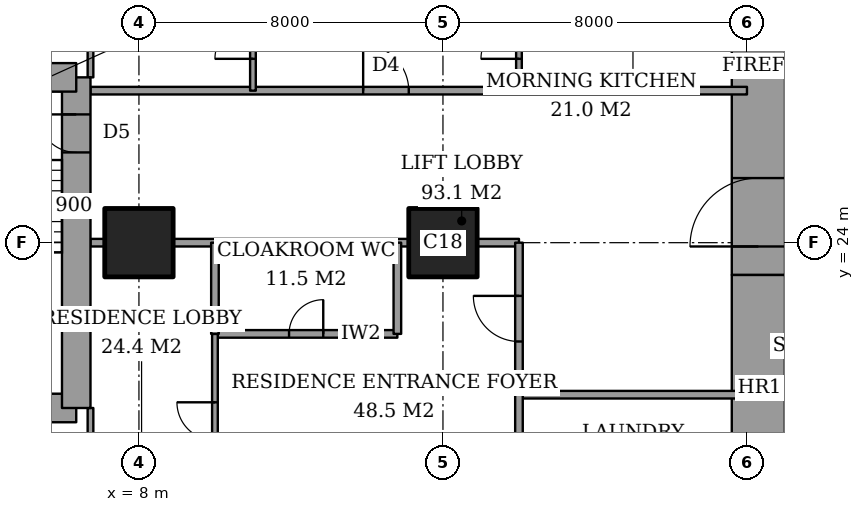
"""IFC4 building model, lengths in metres.
Left out: names, types, materials, properties, quantities, classifications, styles, units other than length and angle.
Written with IfcOpenShell. Run it as: python <this file> out.ifc"""

import sys

from ifc_helpers import new_model, si_unit, direction, frame, frame_2d, origin, origin_2d, place, context, subcontext, project, spatial, rectangle, extrude, element, fill, save


model = new_model("IFC4")
c1 = context("Model", 3, precision=1e-05, world=origin(), true_north=direction((0.0, 1.0)))
c2 = subcontext(c1, "Body", "Model", "MODEL_VIEW")
j1 = project(units=[si_unit("LENGTHUNIT", "METRE"), si_unit("PLANEANGLEUNIT", "RADIAN")], contexts=[c1])
p1 = place(None, origin())
s1 = spatial("IfcSite", under=j1, at=p1, CompositionType="ELEMENT")
p2 = place(p1, origin())
s2 = spatial("IfcBuilding", under=s1, at=p2, CompositionType="ELEMENT")
p3 = place(p2, frame((0.0, 0.0, 203.8)))
s3 = spatial("IfcBuildingStorey", under=s2, at=p3, CompositionType="ELEMENT", Elevation=203.8)
for number, where, z_axis, x_axis in (
    (1, (8.0, 24.0, 0.0), (0.0, 0.0, 1.0), (1.0, 0.0, 0.0)),
    (2, (16.0, 24.0, 0.0), (0.0, 0.0, 1.0), (1.0, 0.0, 0.0)),
):
    element("IfcColumn", number, at=place(p3, frame(where, z_axis=z_axis, x_axis=x_axis)), inside=s3, PredefinedType="COLUMN", context=c2, shape_type="SweptSolid", body=[
        extrude(rectangle(XDim=1.8, YDim=1.8, at=origin_2d()), origin(), (0.0, 0.0, 1.0), 3.6),
    ])
p4 = place(p3, frame((24.3, 13.0, 0.0), z_axis=(0.0, 0.0, 1.0), x_axis=(0.0, 1.0, 0.0)))
e3 = element("IfcWall", 3, at=p4, inside=s3, PredefinedType="SHEAR", context=c2, shape_type="SweptSolid", body=[
    extrude(rectangle(XDim=10.15, YDim=1.4, at=frame_2d((5.075, 0.0))), origin(), (0.0, 0.0, 1.0), 3.6),
])
p5 = place(p3, frame((24.3, 23.15, 0.0), z_axis=(0.0, 0.0, 1.0), x_axis=(0.0, 1.0, 0.0)))
e4 = element("IfcWall", 4, at=p5, inside=s3, PredefinedType="SHEAR", context=c2, shape_type="SweptSolid", body=[
    extrude(rectangle(XDim=11.85, YDim=1.4, at=frame_2d((5.925, 0.0))), origin(), (0.0, 0.0, 1.0), 3.6),
])
p6 = place(p5, frame((0.75, 0.0, 0.0)))
e5 = element("IfcOpeningElement", 5, at=p6, cuts=e4, PredefinedType="OPENING", context=c2, shape_type="SweptSolid", body=[
    extrude(rectangle(XDim=1.8, YDim=2.4, at=frame_2d((0.9, 1.2))), frame((0.0, 0.71, 0.0), z_axis=(0.0, -1.0, 0.0), x_axis=(1.0, 0.0, 0.0)), (0.0, 0.0, 1.0), 1.42),
])
p7 = place(p3, frame((1.9, 19.65, 0.0), z_axis=(0.0, 0.0, 1.0), x_axis=(1.0, 0.0, 0.0)))
e6 = element("IfcWall", 6, at=p7, inside=s3, PredefinedType="SHEAR", context=c2, shape_type="SweptSolid", body=[
    extrude(rectangle(XDim=4.45, YDim=0.75, at=frame_2d((2.225, 0.0))), origin(), (0.0, 0.0, 1.0), 3.6),
])
p8 = place(p3, frame((6.35, 19.65, 0.0), z_axis=(0.0, 0.0, 1.0), x_axis=(0.0, 1.0, 0.0)))
e7 = element("IfcWall", 7, at=p8, inside=s3, PredefinedType="SHEAR", context=c2, shape_type="SweptSolid", body=[
    extrude(rectangle(XDim=8.7, YDim=0.75, at=frame_2d((4.35, 0.0))), origin(), (0.0, 0.0, 1.0), 3.6),
])
p9 = place(p8, frame((6.725, 0.0, 0.0)))
e8 = element("IfcOpeningElement", 8, at=p9, cuts=e7, PredefinedType="OPENING", context=c2, shape_type="SweptSolid", body=[
    extrude(rectangle(XDim=1.0, YDim=2.1, at=frame_2d((0.5, 1.05))), frame((0.0, 0.385, 0.0), z_axis=(0.0, -1.0, 0.0), x_axis=(1.0, 0.0, 0.0)), (0.0, 0.0, 1.0), 0.77),
])
p10 = place(p3, frame((6.35, 28.35, 0.0), z_axis=(0.0, 0.0, 1.0), x_axis=(-1.0, 0.0, 0.0)))
e9 = element("IfcWall", 9, at=p10, inside=s3, PredefinedType="SHEAR", context=c2, shape_type="SweptSolid", body=[
    extrude(rectangle(XDim=4.45, YDim=0.75, at=frame_2d((2.225, 0.0))), origin(), (0.0, 0.0, 1.0), 3.6),
])
p11 = place(p3, frame((18.0, 20.0, 0.0), z_axis=(0.0, 0.0, 1.0), x_axis=(1.0, 0.0, 0.0)))
e10 = element("IfcWall", 10, at=p11, inside=s3, PredefinedType="PARTITIONING", context=c2, shape_type="SweptSolid", body=[
    extrude(rectangle(XDim=6.0, YDim=0.2, at=frame_2d((3.0, 0.0))), origin(), (0.0, 0.0, 1.0), 3.35),
])
p12 = place(p3, frame((10.0, 21.6, 0.0), z_axis=(0.0, 0.0, 1.0), x_axis=(1.0, 0.0, 0.0)))
e11 = element("IfcWall", 11, at=p12, inside=s3, PredefinedType="PARTITIONING", context=c2, shape_type="SweptSolid", body=[
    extrude(rectangle(XDim=4.8, YDim=0.2, at=frame_2d((2.4, 0.0))), origin(), (0.0, 0.0, 1.0), 3.35),
])
p13 = place(p12, frame((1.95, 0.0, 0.0)))
e12 = element("IfcOpeningElement", 12, at=p13, cuts=e11, PredefinedType="OPENING", context=c2, shape_type="SweptSolid", body=[
    extrude(rectangle(XDim=0.9, YDim=2.1, at=frame_2d((0.45, 1.05))), frame((0.0, 0.11, 0.0), z_axis=(0.0, -1.0, 0.0), x_axis=(1.0, 0.0, 0.0)), (0.0, 0.0, 1.0), 0.22),
])
p14 = place(p3, frame((6.725, 24.0, 0.0), z_axis=(0.0, 0.0, 1.0), x_axis=(1.0, 0.0, 0.0)))
e13 = element("IfcWall", 13, at=p14, inside=s3, PredefinedType="PARTITIONING", context=c2, shape_type="SweptSolid", body=[
    extrude(rectangle(XDim=0.375, YDim=0.2, at=frame_2d((0.188, 0.0))), origin(), (0.0, 0.0, 1.0), 3.35),
])
p15 = place(p3, frame((8.9, 24.0, 0.0), z_axis=(0.0, 0.0, 1.0), x_axis=(1.0, 0.0, 0.0)))
e14 = element("IfcWall", 14, at=p15, inside=s3, PredefinedType="PARTITIONING", context=c2, shape_type="SweptSolid", body=[
    extrude(rectangle(XDim=6.2, YDim=0.2, at=frame_2d((3.1, 0.0))), origin(), (0.0, 0.0, 1.0), 3.35),
])
p16 = place(p3, frame((16.9, 24.0, 0.0), z_axis=(0.0, 0.0, 1.0), x_axis=(1.0, 0.0, 0.0)))
e15 = element("IfcWall", 15, at=p16, inside=s3, PredefinedType="PARTITIONING", context=c2, shape_type="SweptSolid", body=[
    extrude(rectangle(XDim=1.1, YDim=0.2, at=frame_2d((0.55, 0.0))), origin(), (0.0, 0.0, 1.0), 3.35),
])
p17 = place(p3, frame((6.725, 28.0, 0.0), z_axis=(0.0, 0.0, 1.0), x_axis=(1.0, 0.0, 0.0)))
e16 = element("IfcWall", 16, at=p17, inside=s3, PredefinedType="PARTITIONING", context=c2, shape_type="SweptSolid", body=[
    extrude(rectangle(XDim=17.275, YDim=0.2, at=frame_2d((8.637, 0.0))), origin(), (0.0, 0.0, 1.0), 3.35),
])
p18 = place(p17, frame((7.175, 0.0, 0.0)))
e17 = element("IfcOpeningElement", 17, at=p18, cuts=e16, PredefinedType="OPENING", context=c2, shape_type="SweptSolid", body=[
    extrude(rectangle(XDim=1.2, YDim=2.4, at=frame_2d((0.6, 1.2))), frame((0.0, 0.11, 0.0), z_axis=(0.0, -1.0, 0.0), x_axis=(1.0, 0.0, 0.0)), (0.0, 0.0, 1.0), 0.22),
])
p19 = place(p3, frame((6.725, 17.2, 0.0), z_axis=(0.0, 0.0, 1.0), x_axis=(0.0, 1.0, 0.0)))
e18 = element("IfcWall", 18, at=p19, inside=s3, PredefinedType="PARTITIONING", context=c2, shape_type="SweptSolid", body=[
    extrude(rectangle(XDim=2.45, YDim=0.15, at=frame_2d((1.225, 0.0))), origin(), (0.0, 0.0, 1.0), 3.35),
])
p20 = place(p19, frame((0.538, 0.0, 0.0)))
e19 = element("IfcOpeningElement", 19, at=p20, cuts=e18, PredefinedType="OPENING", context=c2, shape_type="SweptSolid", body=[
    extrude(rectangle(XDim=1.0, YDim=2.1, at=frame_2d((0.5, 1.05))), frame((0.0, 0.085, 0.0), z_axis=(0.0, -1.0, 0.0), x_axis=(1.0, 0.0, 0.0)), (0.0, 0.0, 1.0), 0.17),
])
p21 = place(p3, frame((6.725, 28.35, 0.0), z_axis=(0.0, 0.0, 1.0), x_axis=(0.0, 1.0, 0.0)))
e20 = element("IfcWall", 20, at=p21, inside=s3, PredefinedType="PARTITIONING", context=c2, shape_type="SweptSolid", body=[
    extrude(rectangle(XDim=2.45, YDim=0.15, at=frame_2d((1.225, 0.0))), origin(), (0.0, 0.0, 1.0), 3.35),
])
p22 = place(p21, frame((0.913, 0.0, 0.0)))
e21 = element("IfcOpeningElement", 21, at=p22, cuts=e20, PredefinedType="OPENING", context=c2, shape_type="SweptSolid", body=[
    extrude(rectangle(XDim=1.0, YDim=2.1, at=frame_2d((0.5, 1.05))), frame((0.0, 0.085, 0.0), z_axis=(0.0, -1.0, 0.0), x_axis=(1.0, 0.0, 0.0)), (0.0, 0.0, 1.0), 0.17),
])
p23 = place(p3, frame((10.0, 21.6, 0.0), z_axis=(0.0, 0.0, 1.0), x_axis=(0.0, 1.0, 0.0)))
e22 = element("IfcWall", 22, at=p23, inside=s3, PredefinedType="PARTITIONING", context=c2, shape_type="SweptSolid", body=[
    extrude(rectangle(XDim=2.4, YDim=0.2, at=frame_2d((1.2, 0.0))), origin(), (0.0, 0.0, 1.0), 3.35),
])
p24 = place(p3, frame((10.0, 10.6, 0.0), z_axis=(0.0, 0.0, 1.0), x_axis=(0.0, 1.0, 0.0)))
e23 = element("IfcWall", 23, at=p24, inside=s3, PredefinedType="PARTITIONING", context=c2, shape_type="SweptSolid", body=[
    extrude(rectangle(XDim=11.0, YDim=0.15, at=frame_2d((5.5, 0.0))), origin(), (0.0, 0.0, 1.0), 3.35),
])
p25 = place(p24, frame((8.2, 0.0, 0.0)))
e24 = element("IfcOpeningElement", 24, at=p25, cuts=e23, PredefinedType="OPENING", context=c2, shape_type="SweptSolid", body=[
    extrude(rectangle(XDim=1.0, YDim=2.1, at=frame_2d((0.5, 1.05))), frame((0.0, 0.085, 0.0), z_axis=(0.0, -1.0, 0.0), x_axis=(1.0, 0.0, 0.0)), (0.0, 0.0, 1.0), 0.17),
])
p26 = place(p3, frame((11.0, 28.0, 0.0), z_axis=(0.0, 0.0, 1.0), x_axis=(0.0, 1.0, 0.0)))
e25 = element("IfcWall", 25, at=p26, inside=s3, PredefinedType="PARTITIONING", context=c2, shape_type="SweptSolid", body=[
    extrude(rectangle(XDim=9.2, YDim=0.15, at=frame_2d((4.6, 0.0))), origin(), (0.0, 0.0, 1.0), 3.35),
])
p27 = place(p26, frame((0.837, 0.0, 0.0)))
e26 = element("IfcOpeningElement", 26, at=p27, cuts=e25, PredefinedType="OPENING", context=c2, shape_type="SweptSolid", body=[
    extrude(rectangle(XDim=1.0, YDim=2.1, at=frame_2d((0.5, 1.05))), frame((0.0, 0.085, 0.0), z_axis=(0.0, -1.0, 0.0), x_axis=(1.0, 0.0, 0.0)), (0.0, 0.0, 1.0), 0.17),
])
p28 = place(p3, frame((14.8, 21.6, 0.0), z_axis=(0.0, 0.0, 1.0), x_axis=(0.0, 1.0, 0.0)))
e27 = element("IfcWall", 27, at=p28, inside=s3, PredefinedType="PARTITIONING", context=c2, shape_type="SweptSolid", body=[
    extrude(rectangle(XDim=2.4, YDim=0.2, at=frame_2d((1.2, 0.0))), origin(), (0.0, 0.0, 1.0), 3.35),
])
p29 = place(p3, frame((18.0, 17.0, 0.0), z_axis=(0.0, 0.0, 1.0), x_axis=(0.0, 1.0, 0.0)))
e28 = element("IfcWall", 28, at=p29, inside=s3, PredefinedType="PARTITIONING", context=c2, shape_type="SweptSolid", body=[
    extrude(rectangle(XDim=7.0, YDim=0.2, at=frame_2d((3.5, 0.0))), origin(), (0.0, 0.0, 1.0), 3.35),
])
p30 = place(p29, frame((4.4, 0.0, 0.0)))
e29 = element("IfcOpeningElement", 29, at=p30, cuts=e28, PredefinedType="OPENING", context=c2, shape_type="SweptSolid", body=[
    extrude(rectangle(XDim=1.2, YDim=2.4, at=frame_2d((0.6, 1.2))), frame((0.0, 0.11, 0.0), z_axis=(0.0, -1.0, 0.0), x_axis=(1.0, 0.0, 0.0)), (0.0, 0.0, 1.0), 0.22),
])
p31 = place(p29, frame((1.05, 0.0, 0.0)))
e30 = element("IfcOpeningElement", 30, at=p31, cuts=e28, PredefinedType="OPENING", context=c2, shape_type="SweptSolid", body=[
    extrude(rectangle(XDim=0.9, YDim=2.1, at=frame_2d((0.45, 1.05))), frame((0.0, 0.11, 0.0), z_axis=(0.0, -1.0, 0.0), x_axis=(1.0, 0.0, 0.0)), (0.0, 0.0, 1.0), 0.22),
])
p32 = place(p3, frame((18.0, 28.0, 0.0), z_axis=(0.0, 0.0, 1.0), x_axis=(0.0, 1.0, 0.0)))
e31 = element("IfcWall", 31, at=p32, inside=s3, PredefinedType="PARTITIONING", context=c2, shape_type="SweptSolid", body=[
    extrude(rectangle(XDim=9.2, YDim=0.15, at=frame_2d((4.6, 0.0))), origin(), (0.0, 0.0, 1.0), 3.35),
])
p33 = place(p32, frame((0.837, 0.0, 0.0)))
e32 = element("IfcOpeningElement", 32, at=p33, cuts=e31, PredefinedType="OPENING", context=c2, shape_type="SweptSolid", body=[
    extrude(rectangle(XDim=1.0, YDim=2.1, at=frame_2d((0.5, 1.05))), frame((0.0, 0.085, 0.0), z_axis=(0.0, -1.0, 0.0), x_axis=(1.0, 0.0, 0.0)), (0.0, 0.0, 1.0), 0.17),
])
p34 = place(p25, origin())
e33 = element("IfcDoor", 33, at=p34, inside=s3, OperationType="SINGLE_SWING_LEFT", PredefinedType="DOOR", context=c2, shape_type="SweptSolid", body=[
    extrude(rectangle(XDim=1.0, YDim=2.1, at=frame_2d((0.5, 1.05))), frame((0.0, 0.025, 0.0), z_axis=(0.0, -1.0, 0.0), x_axis=(1.0, 0.0, 0.0)), (0.0, 0.0, 1.0), 0.05),
])
fill(e24, e33)
p35 = place(p13, origin())
e34 = element("IfcDoor", 34, at=p35, inside=s3, OperationType="SINGLE_SWING_LEFT", PredefinedType="DOOR", context=c2, shape_type="SweptSolid", body=[
    extrude(rectangle(XDim=0.9, YDim=2.1, at=frame_2d((0.45, 1.05))), frame((0.0, 0.025, 0.0), z_axis=(0.0, -1.0, 0.0), x_axis=(1.0, 0.0, 0.0)), (0.0, 0.0, 1.0), 0.05),
])
fill(e12, e34)
p36 = place(p30, origin())
e35 = element("IfcDoor", 35, at=p36, inside=s3, OperationType="SINGLE_SWING_LEFT", PredefinedType="DOOR", context=c2, shape_type="SweptSolid", body=[
    extrude(rectangle(XDim=1.2, YDim=2.4, at=frame_2d((0.6, 1.2))), frame((0.0, 0.025, 0.0), z_axis=(0.0, -1.0, 0.0), x_axis=(1.0, 0.0, 0.0)), (0.0, 0.0, 1.0), 0.05),
])
fill(e29, e35)
p37 = place(p27, origin())
e36 = element("IfcDoor", 36, at=p37, inside=s3, OperationType="SINGLE_SWING_RIGHT", PredefinedType="DOOR", context=c2, shape_type="SweptSolid", body=[
    extrude(rectangle(XDim=1.0, YDim=2.1, at=frame_2d((0.5, 1.05))), frame((0.0, 0.025, 0.0), z_axis=(0.0, -1.0, 0.0), x_axis=(1.0, 0.0, 0.0)), (0.0, 0.0, 1.0), 0.05),
])
fill(e26, e36)
p38 = place(p18, origin())
e37 = element("IfcDoor", 37, at=p38, inside=s3, OperationType="SINGLE_SWING_RIGHT", PredefinedType="DOOR", context=c2, shape_type="SweptSolid", body=[
    extrude(rectangle(XDim=1.2, YDim=2.4, at=frame_2d((0.6, 1.2))), frame((0.0, 0.025, 0.0), z_axis=(0.0, -1.0, 0.0), x_axis=(1.0, 0.0, 0.0)), (0.0, 0.0, 1.0), 0.05),
])
fill(e17, e37)
p39 = place(p33, origin())
e38 = element("IfcDoor", 38, at=p39, inside=s3, OperationType="SINGLE_SWING_RIGHT", PredefinedType="DOOR", context=c2, shape_type="SweptSolid", body=[
    extrude(rectangle(XDim=1.0, YDim=2.1, at=frame_2d((0.5, 1.05))), frame((0.0, 0.025, 0.0), z_axis=(0.0, -1.0, 0.0), x_axis=(1.0, 0.0, 0.0)), (0.0, 0.0, 1.0), 0.05),
])
fill(e32, e38)
p40 = place(p6, origin())
e39 = element("IfcDoor", 39, at=p40, inside=s3, OperationType="DOUBLE_DOOR_DOUBLE_SWING", PredefinedType="DOOR", context=c2, shape_type="SweptSolid", body=[
    extrude(rectangle(XDim=1.8, YDim=2.4, at=frame_2d((0.9, 1.2))), frame((0.0, 0.025, 0.0), z_axis=(0.0, -1.0, 0.0), x_axis=(1.0, 0.0, 0.0)), (0.0, 0.0, 1.0), 0.05),
])
fill(e5, e39)
p41 = place(p9, origin())
e40 = element("IfcDoor", 40, at=p41, inside=s3, OperationType="SINGLE_SWING_LEFT", PredefinedType="DOOR", context=c2, shape_type="SweptSolid", body=[
    extrude(rectangle(XDim=1.0, YDim=2.1, at=frame_2d((0.5, 1.05))), frame((0.0, 0.025, 0.0), z_axis=(0.0, -1.0, 0.0), x_axis=(1.0, 0.0, 0.0)), (0.0, 0.0, 1.0), 0.05),
])
fill(e8, e40)
save(model, sys.argv[1])
